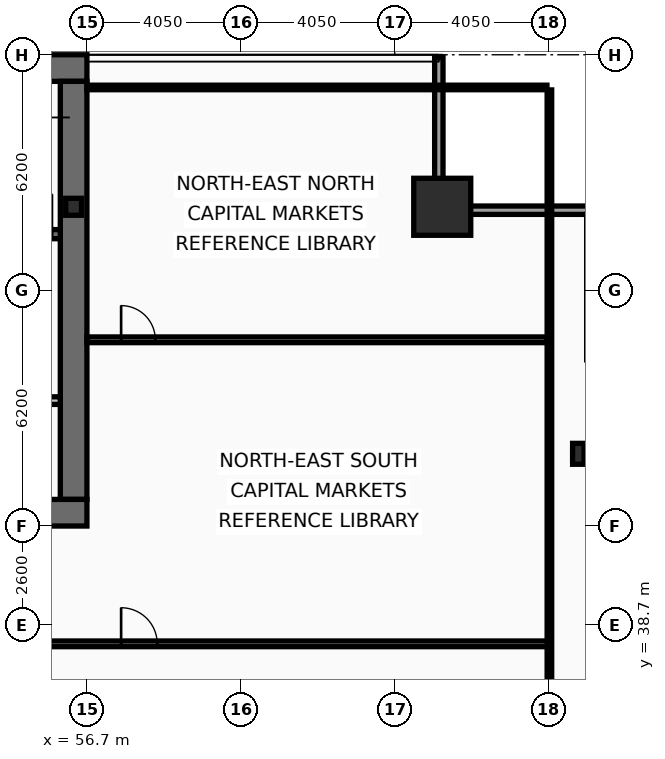
"""IFC4 building model, lengths in metres.
Left out: names, types, materials, properties, quantities, classifications, styles, units other than length and angle.
Written with IfcOpenShell. Run it as: python <this file> out.ifc"""

import sys

from ifc_helpers import new_model, si_unit, direction, frame, frame_2d, origin, origin_2d, place, context, subcontext, project, spatial, rectangle, hollow_rectangle, i_section, extrude, element, fill, save


model = new_model("IFC4")
c1 = context("Model", 3, precision=1e-05, world=origin(), true_north=direction((0.0, 1.0)))
c2 = subcontext(c1, "Body", "Model", "MODEL_VIEW")
j1 = project(units=[si_unit("LENGTHUNIT", "METRE"), si_unit("PLANEANGLEUNIT", "RADIAN")], contexts=[c1])
p1 = place(None, origin())
s1 = spatial("IfcSite", under=j1, at=p1, CompositionType="ELEMENT")
p2 = place(p1, origin())
s2 = spatial("IfcBuilding", under=s1, at=p2, CompositionType="ELEMENT")
p3 = place(p2, frame((0.0, 0.0, 121.8)))
s3 = spatial("IfcBuildingStorey", under=s2, at=p3, CompositionType="ELEMENT", Elevation=121.8)
p4 = place(p3, frame((16.2, 53.35, 0.0), z_axis=(0.0, 0.0, 1.0), x_axis=(1.0, 0.0, 0.0)))
e1 = element("IfcWall", 1, at=p4, inside=s3, PredefinedType="SHEAR", context=c2, shape_type="SweptSolid", body=[
    extrude(rectangle(XDim=40.5, YDim=0.7, at=frame_2d((20.25, 0.0))), origin(), (0.0, 0.0, 1.0), 3.44),
])
p5 = place(p3, frame((56.35, 53.0, 0.0), z_axis=(0.0, 0.0, 1.0), x_axis=(0.0, -1.0, 0.0)))
e2 = element("IfcWall", 2, at=p5, inside=s3, PredefinedType="SHEAR", context=c2, shape_type="SweptSolid", body=[
    extrude(rectangle(XDim=11.0, YDim=0.7, at=frame_2d((5.5, 0.0))), origin(), (0.0, 0.0, 1.0), 3.44),
])
p6 = place(p3, frame((56.7, 41.65, 0.0), z_axis=(0.0, 0.0, 1.0), x_axis=(-1.0, 0.0, 0.0)))
e3 = element("IfcWall", 3, at=p6, inside=s3, PredefinedType="SHEAR", context=c2, shape_type="SweptSolid", body=[
    extrude(rectangle(XDim=2.45, YDim=0.7, at=frame_2d((1.225, 0.0))), origin(), (0.0, 0.0, 1.0), 3.44),
])
p7 = place(p3, frame((48.63, 48.98, 0.0), z_axis=(0.0, 0.0, 1.0), x_axis=(1.0, 0.0, 0.0)))
e4 = element("IfcWall", 4, at=p7, inside=s3, PredefinedType="SHEAR", context=c2, shape_type="SweptSolid", body=[
    extrude(rectangle(XDim=7.37, YDim=0.24, at=frame_2d((3.685, 0.0))), origin(), (0.0, 0.0, 1.0), 3.44),
])
p8 = place(p7, frame((6.1, 0.0, 0.0)))
e5 = element("IfcOpeningElement", 5, at=p8, cuts=e4, PredefinedType="OPENING", context=c2, shape_type="SweptSolid", body=[
    extrude(rectangle(XDim=1.05, YDim=2.15, at=frame_2d((0.525, 1.075))), frame((0.0, 0.13, 0.0), z_axis=(0.0, -1.0, 0.0), x_axis=(1.0, 0.0, 0.0)), (0.0, 0.0, 1.0), 0.26),
])
p9 = place(p3, frame((66.05, 49.7, 0.0), z_axis=(0.0, 0.0, 1.0), x_axis=(1.0, 0.0, 0.0)))
e6 = element("IfcColumn", 6, at=p9, inside=s3, PredefinedType="COLUMN", context=c2, shape_type="SweptSolid", body=[
    extrude(hollow_rectangle(XDim=1.5, YDim=1.5, WallThickness=0.07, at=origin_2d()), origin(), (0.0, 0.0, 1.0), 3.6),
])
p10 = place(p3, frame((69.63, 43.2, 0.0), z_axis=(0.0, 0.0, 1.0), x_axis=(1.0, 0.0, 0.0)))
e7 = element("IfcColumn", 7, at=p10, inside=s3, PredefinedType="COLUMN", context=c2, shape_type="SweptSolid", body=[
    extrude(i_section(OverallWidth=0.3, OverallDepth=0.55, WebThickness=0.015, FlangeThickness=0.029, at=origin_2d()), origin(), (0.0, 0.0, 1.0), 3.6),
])
p11 = place(p3, frame((56.35, 49.7, 0.0), z_axis=(0.0, 0.0, 1.0), x_axis=(1.0, 0.0, 0.0)))
e8 = element("IfcColumn", 8, at=p11, inside=s3, PredefinedType="COLUMN", context=c2, shape_type="SweptSolid", body=[
    extrude(i_section(OverallWidth=0.416, OverallDepth=0.446, WebThickness=0.039, FlangeThickness=0.063, at=origin_2d()), origin(), (0.0, 0.0, 1.0), 3.6),
])
p12 = place(p3, frame((65.96, 53.63, 0.0), z_axis=(0.0, 0.0, 1.0), x_axis=(0.0, -1.0, 0.0)))
e9 = element("IfcWall", 9, at=p12, inside=s3, PredefinedType="SOLIDWALL", context=c2, shape_type="SweptSolid", body=[
    extrude(rectangle(XDim=3.91, YDim=0.22, at=frame_2d((1.955, 0.0))), origin(), (0.0, 0.0, 1.0), 2.83),
])
p13 = place(p3, frame((65.85, 49.61, 0.0), z_axis=(0.0, 0.0, 1.0), x_axis=(1.0, 0.0, 0.0)))
e10 = element("IfcWall", 10, at=p13, inside=s3, PredefinedType="SOLIDWALL", context=c2, shape_type="SweptSolid", body=[
    extrude(rectangle(XDim=4.22, YDim=0.22, at=frame_2d((2.11, 0.0))), origin(), (0.0, 0.0, 1.0), 2.83),
])
p14 = place(p3, frame((51.9, 44.6, 0.0), z_axis=(0.0, 0.0, 1.0), x_axis=(1.0, 0.0, 0.0)))
e11 = element("IfcWall", 11, at=p14, inside=s3, PredefinedType="PARTITIONING", context=c2, shape_type="SweptSolid", body=[
    extrude(rectangle(XDim=4.1, YDim=0.2, at=frame_2d((2.05, 0.0))), origin(), (0.0, 0.0, 1.0), 3.44),
])
p15 = place(p14, frame((1.15, 0.0, 0.0)))
e12 = element("IfcOpeningElement", 12, at=p15, cuts=e11, PredefinedType="OPENING", context=c2, shape_type="SweptSolid", body=[
    extrude(rectangle(XDim=1.05, YDim=2.15, at=frame_2d((0.525, 1.075))), frame((0.0, 0.11, 0.0), z_axis=(0.0, -1.0, 0.0), x_axis=(1.0, 0.0, 0.0)), (0.0, 0.0, 1.0), 0.22),
])
p16 = place(p3, frame((54.35, 38.2, 0.0), z_axis=(0.0, 0.0, 1.0), x_axis=(1.0, 0.0, 0.0)))
e13 = element("IfcWall", 13, at=p16, inside=s3, PredefinedType="PARTITIONING", context=c2, shape_type="SweptSolid", body=[
    extrude(rectangle(XDim=14.52, YDim=0.15, at=frame_2d((7.26, 0.0))), origin(), (0.0, 0.0, 1.0), 2.73),
])
p17 = place(p16, frame((3.25, 0.0, 0.0)))
e14 = element("IfcOpeningElement", 14, at=p17, cuts=e13, PredefinedType="OPENING", context=c2, shape_type="SweptSolid", body=[
    extrude(rectangle(XDim=0.95, YDim=2.05, at=frame_2d((0.475, 1.025))), frame((0.0, 0.085, 0.0), z_axis=(0.0, -1.0, 0.0), x_axis=(1.0, 0.0, 0.0)), (0.0, 0.0, 1.0), 0.17),
])
p18 = place(p3, frame((56.7, 46.2, 0.0), z_axis=(0.0, 0.0, 1.0), x_axis=(1.0, 0.0, 0.0)))
e15 = element("IfcWall", 15, at=p18, inside=s3, PredefinedType="PARTITIONING", context=c2, shape_type="SweptSolid", body=[
    extrude(rectangle(XDim=12.105, YDim=0.15, at=frame_2d((6.052, 0.0))), origin(), (0.0, 0.0, 1.0), 2.83),
])
p19 = place(p18, frame((0.9, 0.0, 0.0)))
e16 = element("IfcOpeningElement", 16, at=p19, cuts=e15, PredefinedType="OPENING", context=c2, shape_type="SweptSolid", body=[
    extrude(rectangle(XDim=0.9, YDim=2.05, at=frame_2d((0.45, 1.025))), frame((0.0, 0.085, 0.0), z_axis=(0.0, -1.0, 0.0), x_axis=(1.0, 0.0, 0.0)), (0.0, 0.0, 1.0), 0.17),
])
p20 = place(p3, frame((68.87, 10.665, 0.0), z_axis=(0.0, 0.0, 1.0), x_axis=(0.0, 1.0, 0.0)))
e17 = element("IfcWall", 17, at=p20, inside=s3, PredefinedType="PARTITIONING", context=c2, shape_type="SweptSolid", body=[
    extrude(rectangle(XDim=42.11, YDim=0.12, at=frame_2d((21.055, 0.0))), origin(), (0.0, 0.0, 1.0), 2.73),
])
p21 = place(p3, frame((56.7, 52.84, 0.0), z_axis=(0.0, 0.0, 1.0), x_axis=(1.0, 0.0, 0.0)))
e18 = element("IfcWall", 18, at=p21, inside=s3, PredefinedType="PARTITIONING", context=c2, shape_type="SweptSolid", body=[
    extrude(rectangle(XDim=12.105, YDim=0.12, at=frame_2d((6.052, 0.0))), origin(), (0.0, 0.0, 1.0), 3.44),
])
p22 = place(p17, origin())
e19 = element("IfcDoor", 19, at=p22, inside=s3, OperationType="SINGLE_SWING_LEFT", PredefinedType="DOOR", context=c2, shape_type="SweptSolid", body=[
    extrude(rectangle(XDim=0.95, YDim=2.05, at=frame_2d((0.475, 1.025))), frame((0.0, 0.025, 0.0), z_axis=(0.0, -1.0, 0.0), x_axis=(1.0, 0.0, 0.0)), (0.0, 0.0, 1.0), 0.05),
])
fill(e14, e19)
p23 = place(p19, origin())
e20 = element("IfcDoor", 20, at=p23, inside=s3, OperationType="SINGLE_SWING_LEFT", PredefinedType="DOOR", context=c2, shape_type="SweptSolid", body=[
    extrude(rectangle(XDim=0.9, YDim=2.05, at=frame_2d((0.45, 1.025))), frame((0.0, 0.025, 0.0), z_axis=(0.0, -1.0, 0.0), x_axis=(1.0, 0.0, 0.0)), (0.0, 0.0, 1.0), 0.05),
])
fill(e16, e20)
save(model, sys.argv[1])
